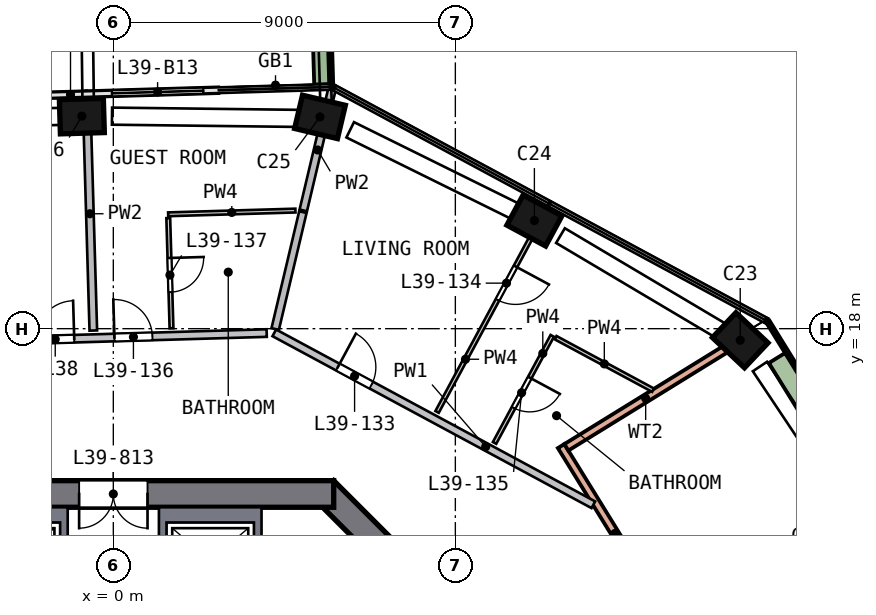
"""IFC4 building model, lengths in metres.
Left out: names, types, materials, properties, quantities, classifications, styles, units other than length and angle.
Written with IfcOpenShell. Run it as: python <this file> out.ifc"""

import sys

from ifc_helpers import new_model, si_unit, direction, frame, frame_2d, origin, origin_2d, place, context, subcontext, project, spatial, polyline, rectangle, outline, extrude, element, fill, save


model = new_model("IFC4")
c1 = context("Model", 3, precision=1e-05, world=origin(), true_north=direction((0.0, 1.0)))
c2 = subcontext(c1, "Body", "Model", "MODEL_VIEW")
j1 = project(units=[si_unit("LENGTHUNIT", "METRE"), si_unit("PLANEANGLEUNIT", "RADIAN")], contexts=[c1])
p1 = place(None, origin())
s1 = spatial("IfcSite", under=j1, at=p1, CompositionType="ELEMENT")
p2 = place(p1, origin())
s2 = spatial("IfcBuilding", under=s1, at=p2, CompositionType="ELEMENT")
p3 = place(p2, frame((0.0, 0.0, 162.0)))
s3 = spatial("IfcBuildingStorey", under=s2, at=p3, CompositionType="ELEMENT", Elevation=162.0)
p4 = place(p3, frame((16.598, 17.601, 0.0), z_axis=(-0.084388982, 0.078230867, 0.993357152), x_axis=(0.722727157, -0.681487218, 0.115067924)))
e1 = element("IfcColumn", 1, at=p4, inside=s3, PredefinedType="COLUMN", context=c2, shape_type="SweptSolid", body=[
    extrude(rectangle(XDim=1.15, YDim=0.9, at=origin_2d()), origin(), (0.0, 0.0, 1.0), 3.211),
])
p5 = place(p3, frame((11.2, 20.783, 0.0), z_axis=(-0.09932145, 0.052474579, 0.993670805), x_axis=(-0.874616696, 0.471622943, -0.112327356)))
e2 = element("IfcColumn", 2, at=p5, inside=s3, PredefinedType="COLUMN", context=c2, shape_type="SweptSolid", body=[
    extrude(rectangle(XDim=1.15, YDim=0.9, at=origin_2d()), origin(), (0.0, 0.0, 1.0), 3.21),
])
p6 = place(p3, frame((5.574, 23.542, 0.0), z_axis=(-0.112214366, 0.025544734, 0.993355627), x_axis=(0.966669959, -0.228704033, 0.115081082)))
e3 = element("IfcColumn", 3, at=p6, inside=s3, PredefinedType="COLUMN", context=c2, shape_type="SweptSolid", body=[
    extrude(rectangle(XDim=1.15, YDim=0.9, at=origin_2d()), origin(), (0.0, 0.0, 1.0), 3.211),
])
p7 = place(p3, frame((-0.692, 23.598, 0.0), z_axis=(-0.112250014, -0.004182758, 0.993671193), x_axis=(-0.993260713, -0.02857431, -0.112323925)))
e4 = element("IfcColumn", 4, at=p7, inside=s3, PredefinedType="COLUMN", context=c2, shape_type="SweptSolid", body=[
    extrude(rectangle(XDim=1.15, YDim=0.9, at=origin_2d()), origin(), (0.0, 0.0, 1.0), 3.21),
])
p8 = place(p3, frame((13.752, 5.552, 0.0), z_axis=(0.0, 0.0, 1.0), x_axis=(-0.707106781, 0.707106781, 0.0)))
e5 = element("IfcWall", 5, at=p8, inside=s3, PredefinedType="SHEAR", context=c2, shape_type="SweptSolid", body=[
    extrude(rectangle(XDim=11.598, YDim=0.7, at=frame_2d((5.799, 0.0))), origin(), (0.0, 0.0, 1.0), 3.5),
])
p9 = place(p8, frame((2.099, 0.0, 0.0)))
e6 = element("IfcOpeningElement", 6, at=p9, cuts=e5, PredefinedType="OPENING", context=c2, shape_type="SweptSolid", body=[
    extrude(rectangle(XDim=1.2, YDim=2.1, at=frame_2d((0.6, 1.05))), frame((0.0, 0.36, 0.0), z_axis=(0.0, -1.0, 0.0), x_axis=(1.0, 0.0, 0.0)), (0.0, 0.0, 1.0), 0.72),
])
p10 = place(p3, frame((5.799, 13.65, 0.0), z_axis=(0.0, 0.0, 1.0), x_axis=(-1.0, 0.0, 0.0)))
e7 = element("IfcWall", 7, at=p10, inside=s3, PredefinedType="SHEAR", context=c2, shape_type="SweptSolid", body=[
    extrude(rectangle(XDim=11.598, YDim=0.7, at=frame_2d((5.799, 0.0))), origin(), (0.0, 0.0, 1.0), 3.5),
])
p11 = place(p10, frame((4.899, 0.0, 0.0)))
e8 = element("IfcOpeningElement", 8, at=p11, cuts=e7, PredefinedType="OPENING", context=c2, shape_type="SweptSolid", body=[
    extrude(rectangle(XDim=1.8, YDim=2.1, at=frame_2d((0.9, 1.05))), frame((0.0, 0.36, 0.0), z_axis=(0.0, -1.0, 0.0), x_axis=(1.0, 0.0, 0.0)), (0.0, 0.0, 1.0), 0.72),
])
p12 = place(p3, frame((2.764, 24.275, 0.0), z_axis=(0.0, 0.0, 1.0), x_axis=(-0.999568665, -0.029368082, 0.0)))
e9 = element("IfcWall", 9, at=p12, inside=s3, PredefinedType="SOLIDWALL", context=c2, shape_type="SweptSolid", body=[
    extrude(rectangle(XDim=3.475, YDim=0.15, at=frame_2d((1.737, 0.0))), origin(), (0.0, 0.0, 1.0), 2.475),
])
p13 = place(p12, frame((0.4, 0.0, 0.0)))
e10 = element("IfcOpeningElement", 10, at=p13, cuts=e9, PredefinedType="OPENING", context=c2, shape_type="SweptSolid", body=[
    extrude(rectangle(XDim=2.4, YDim=2.4, at=frame_2d((1.2, 1.2))), frame((0.0, 0.085, 0.0), z_axis=(0.0, -1.0, 0.0), x_axis=(1.0, 0.0, 0.0)), (0.0, 0.0, 1.0), 0.17),
])
p14 = place(p3, frame((-0.709, 24.173, 0.0), z_axis=(0.0, 0.0, 1.0), x_axis=(-0.999571268, -0.029279342, 0.0)))
e11 = element("IfcWall", 11, at=p14, inside=s3, PredefinedType="SOLIDWALL", context=c2, shape_type="SweptSolid", body=[
    extrude(rectangle(XDim=3.836, YDim=0.15, at=frame_2d((1.918, 0.0))), origin(), (0.0, 0.0, 1.0), 2.475),
])
p15 = place(p14, frame((1.035, 0.0, 0.0)))
e12 = element("IfcOpeningElement", 12, at=p15, cuts=e11, PredefinedType="OPENING", context=c2, shape_type="SweptSolid", body=[
    extrude(rectangle(XDim=2.4, YDim=2.4, at=frame_2d((1.2, 1.2))), frame((0.0, 0.085, 0.0), z_axis=(0.0, -1.0, 0.0), x_axis=(1.0, 0.0, 0.0)), (0.0, 0.0, 1.0), 0.17),
])
p16 = place(p3, frame((5.536, 24.432, 0.0), z_axis=(0.0, 0.0, 1.0), x_axis=(-0.029304862, 0.99957052, 0.0)))
e13 = element("IfcWall", 13, at=p16, inside=s3, PredefinedType="SOLIDWALL", context=c2, shape_type="SweptSolid", body=[
    extrude(rectangle(XDim=3.199, YDim=0.5, at=frame_2d((1.6, 0.0))), origin(), (0.0, 0.0, 1.0), 0.7),
])
p17 = place(p3, frame((11.784, 14.91, 0.0), z_axis=(0.0, 0.0, 1.0), x_axis=(0.525179384, -0.850991548, 0.0)))
e14 = element("IfcWall", 14, at=p17, inside=s3, PredefinedType="SOLIDWALL", context=c2, shape_type="SweptSolid", body=[
    extrude(rectangle(XDim=13.0, YDim=0.2, at=frame_2d((6.5, 0.0))), origin(), (0.0, 0.0, 1.0), 3.19),
])
p18 = place(p17, frame((5.6, 0.0, 0.0)))
e15 = element("IfcOpeningElement", 15, at=p18, cuts=e14, PredefinedType="OPENING", context=c2, shape_type="SweptSolid", body=[
    extrude(rectangle(XDim=1.8, YDim=2.4, at=frame_2d((0.9, 1.2))), frame((0.0, 0.11, 0.0), z_axis=(0.0, -1.0, 0.0), x_axis=(1.0, 0.0, 0.0)), (0.0, 0.0, 1.0), 0.22),
])
p19 = place(p3, frame((16.094, 17.453, 0.0), z_axis=(0.0, 0.0, 1.0), x_axis=(-0.851008082, -0.525152592, 0.0)))
e16 = element("IfcWall", 16, at=p19, inside=s3, PredefinedType="SOLIDWALL", context=c2, shape_type="SweptSolid", body=[
    extrude(rectangle(XDim=4.904, YDim=0.2, at=frame_2d((2.452, 0.0))), origin(), (0.0, 0.0, 1.0), 3.19),
])
p20 = place(p3, frame((23.973, 7.25, 0.0), z_axis=(0.0, 0.0, 1.0), x_axis=(-0.525170615, 0.85099696, 0.0)))
e17 = element("IfcWall", 17, at=p20, inside=s3, PredefinedType="SOLIDWALL", context=c2, shape_type="SweptSolid", body=[
    extrude(rectangle(XDim=12.84, YDim=0.1, at=frame_2d((6.42, 0.0))), origin(), (0.0, 0.0, 1.0), 0.7),
])
p21 = place(p3, frame((19.802, 13.437, 0.0), z_axis=(0.0, 0.0, 1.0), x_axis=(-0.525152092, 0.85100839, 0.0)))
e18 = element("IfcWall", 18, at=p21, inside=s3, PredefinedType="SOLIDWALL", context=c2, shape_type="SweptSolid", body=[
    extrude(rectangle(XDim=4.454, YDim=0.5, at=frame_2d((2.227, 0.0))), origin(), (0.0, 0.0, 1.0), 0.7),
])
p22 = place(p3, origin())
e19 = element("IfcWall", 19, at=p22, inside=s3, PredefinedType="SOLIDWALL", context=c2, shape_type="SweptSolid", body=[
    extrude(outline(polyline([(3.9, 13.3), (3.9, 10.9), (3.7, 10.9), (3.7, 12.9), (1.4, 12.9), (1.4, 10.9), (1.2, 10.9), (1.2, 13.3), (3.9, 13.3)])), origin(), (0.0, 0.0, 1.0), 3.19),
])
p23 = place(p3, origin())
e20 = element("IfcWall", 20, at=p23, inside=s3, PredefinedType="SOLIDWALL", context=c2, shape_type="SweptSolid", body=[
    extrude(outline(polyline([(-3.9, 10.9), (-3.9, 13.3), (-1.2, 13.3), (-1.2, 10.9), (-1.4, 10.9), (-1.4, 12.9), (-3.7, 12.9), (-3.7, 10.9), (-3.9, 10.9)])), origin(), (0.0, 0.0, 1.0), 3.19),
])
p24 = place(p3, frame((-5.277, 17.611, 0.0), z_axis=(0.0, 0.0, 1.0), x_axis=(0.999569971, 0.029323584, 0.0)))
e21 = element("IfcWall", 21, at=p24, inside=s3, PredefinedType="SOLIDWALL", context=c2, shape_type="SweptSolid", body=[
    extrude(rectangle(XDim=9.316, YDim=0.2, at=frame_2d((4.658, 0.0))), origin(), (0.0, 0.0, 1.0), 3.19),
])
p25 = place(p24, frame((5.308, 0.0, 0.0)))
e22 = element("IfcOpeningElement", 22, at=p25, cuts=e21, PredefinedType="OPENING", context=c2, shape_type="SweptSolid", body=[
    extrude(rectangle(XDim=1.0, YDim=2.1, at=frame_2d((0.5, 1.05))), frame((0.0, 0.11, 0.0), z_axis=(0.0, -1.0, 0.0), x_axis=(1.0, 0.0, 0.0)), (0.0, 0.0, 1.0), 0.22),
])
p26 = place(p24, frame((3.25, 0.0, 0.0)))
e23 = element("IfcOpeningElement", 23, at=p26, cuts=e21, PredefinedType="OPENING", context=c2, shape_type="SweptSolid", body=[
    extrude(rectangle(XDim=1.0, YDim=2.1, at=frame_2d((0.5, 1.05))), frame((0.0, 0.11, 0.0), z_axis=(0.0, -1.0, 0.0), x_axis=(1.0, 0.0, 0.0)), (0.0, 0.0, 1.0), 0.22),
])
p27 = place(p3, frame((4.236, 17.89, 0.0), z_axis=(0.0, 0.0, 1.0), x_axis=(0.880311578, -0.474395959, 0.0)))
e24 = element("IfcWall", 24, at=p27, inside=s3, PredefinedType="SOLIDWALL", context=c2, shape_type="SweptSolid", body=[
    extrude(rectangle(XDim=9.537, YDim=0.2, at=frame_2d((4.768, 0.0))), origin(), (0.0, 0.0, 1.0), 3.19),
])
p28 = place(p27, frame((1.9, 0.0, 0.0)))
e25 = element("IfcOpeningElement", 25, at=p28, cuts=e24, PredefinedType="OPENING", context=c2, shape_type="SweptSolid", body=[
    extrude(rectangle(XDim=1.0, YDim=2.1, at=frame_2d((0.5, 1.05))), frame((0.0, 0.11, 0.0), z_axis=(0.0, -1.0, 0.0), x_axis=(1.0, 0.0, 0.0)), (0.0, 0.0, 1.0), 0.22),
])
p29 = place(p3, frame((-0.527, 17.951, 0.0), z_axis=(0.0, 0.0, 1.0), x_axis=(-0.029297558, 0.999570734, 0.0)))
e26 = element("IfcWall", 26, at=p29, inside=s3, PredefinedType="SOLIDWALL", context=c2, shape_type="SweptSolid", body=[
    extrude(rectangle(XDim=6.15, YDim=0.2, at=frame_2d((3.075, 0.0))), origin(), (0.0, 0.0, 1.0), 3.19),
])
p30 = place(p3, frame((4.26, 17.991, 0.0), z_axis=(0.0, 0.0, 1.0), x_axis=(0.230360547, 0.973105348, 0.0)))
e27 = element("IfcWall", 27, at=p30, inside=s3, PredefinedType="SOLIDWALL", context=c2, shape_type="SweptSolid", body=[
    extrude(rectangle(XDim=3.161, YDim=0.2, at=frame_2d((1.581, 0.0))), origin(), (0.0, 0.0, 1.0), 3.19),
])
p31 = place(p3, frame((4.998, 21.112, 0.0), z_axis=(0.0, 0.0, 1.0), x_axis=(0.230425438, 0.973089984, 0.0)))
e28 = element("IfcWall", 28, at=p31, inside=s3, PredefinedType="SOLIDWALL", context=c2, shape_type="SweptSolid", body=[
    extrude(rectangle(XDim=3.269, YDim=0.2, at=frame_2d((1.634, 0.0))), origin(), (0.0, 0.0, 1.0), 3.19),
])
p32 = place(p3, frame((1.446, 20.91, 0.0), z_axis=(0.0, 0.0, 1.0), x_axis=(0.029381734, -0.999568264, 0.0)))
e29 = element("IfcWall", 29, at=p32, inside=s3, PredefinedType="PARTITIONING", context=c2, shape_type="SweptSolid", body=[
    extrude(rectangle(XDim=2.9, YDim=0.1, at=frame_2d((1.45, 0.0))), origin(), (0.0, 0.0, 1.0), 3.19),
])
p33 = place(p32, frame((1.05, 0.0, 0.0)))
e30 = element("IfcOpeningElement", 30, at=p33, cuts=e29, PredefinedType="OPENING", context=c2, shape_type="SweptSolid", body=[
    extrude(rectangle(XDim=0.9, YDim=2.1, at=frame_2d((0.45, 1.05))), frame((0.0, 0.06, 0.0), z_axis=(0.0, -1.0, 0.0), x_axis=(1.0, 0.0, 0.0)), (0.0, 0.0, 1.0), 0.12),
])
p34 = place(p3, frame((1.443, 21.01, 0.0), z_axis=(0.0, 0.0, 1.0), x_axis=(0.999570835, 0.029294122, 0.0)))
e31 = element("IfcWall", 31, at=p34, inside=s3, PredefinedType="PARTITIONING", context=c2, shape_type="SweptSolid", body=[
    extrude(rectangle(XDim=3.35, YDim=0.1, at=frame_2d((1.675, 0.0))), origin(), (0.0, 0.0, 1.0), 3.19),
])
p35 = place(p3, frame((11.437, 21.223, 0.0), z_axis=(0.0, 0.0, 1.0), x_axis=(-0.474409898, -0.880304066, 0.0)))
e32 = element("IfcWall", 32, at=p35, inside=s3, PredefinedType="PARTITIONING", context=c2, shape_type="SweptSolid", body=[
    extrude(rectangle(XDim=6.15, YDim=0.1, at=frame_2d((3.075, 0.0))), origin(), (0.0, 0.0, 1.0), 3.19),
])
p36 = place(p35, frame((1.8, 0.0, 0.0)))
e33 = element("IfcOpeningElement", 33, at=p36, cuts=e32, PredefinedType="OPENING", context=c2, shape_type="SweptSolid", body=[
    extrude(rectangle(XDim=1.0, YDim=2.1, at=frame_2d((0.5, 1.05))), frame((0.0, 0.06, 0.0), z_axis=(0.0, -1.0, 0.0), x_axis=(1.0, 0.0, 0.0)), (0.0, 0.0, 1.0), 0.12),
])
p37 = place(p3, frame((11.55, 17.811, 0.0), z_axis=(0.0, 0.0, 1.0), x_axis=(-0.474409178, -0.880304454, 0.0)))
e34 = element("IfcWall", 34, at=p37, inside=s3, PredefinedType="PARTITIONING", context=c2, shape_type="SweptSolid", body=[
    extrude(rectangle(XDim=3.2, YDim=0.1, at=frame_2d((1.6, 0.0))), origin(), (0.0, 0.0, 1.0), 3.19),
])
p38 = place(p37, frame((1.25, 0.0, 0.0)))
e35 = element("IfcOpeningElement", 35, at=p38, cuts=e34, PredefinedType="OPENING", context=c2, shape_type="SweptSolid", body=[
    extrude(rectangle(XDim=0.9, YDim=2.1, at=frame_2d((0.45, 1.05))), frame((0.0, 0.06, 0.0), z_axis=(0.0, -1.0, 0.0), x_axis=(1.0, 0.0, 0.0)), (0.0, 0.0, 1.0), 0.12),
])
p39 = place(p3, frame((14.201, 16.382, 0.0), z_axis=(0.0, 0.0, 1.0), x_axis=(-0.880306815, 0.474404797, 0.0)))
e36 = element("IfcWall", 36, at=p39, inside=s3, PredefinedType="PARTITIONING", context=c2, shape_type="SweptSolid", body=[
    extrude(rectangle(XDim=2.912, YDim=0.1, at=frame_2d((1.456, 0.0))), origin(), (0.0, 0.0, 1.0), 3.19),
])
p40 = place(p13, origin())
e37 = element("IfcDoor", 37, at=p40, inside=s3, OperationType="SLIDING_TO_RIGHT", PredefinedType="DOOR", context=c2, shape_type="SweptSolid", body=[
    extrude(rectangle(XDim=2.4, YDim=2.4, at=frame_2d((1.2, 1.2))), frame((0.0, 0.025, 0.0), z_axis=(0.0, -1.0, 0.0), x_axis=(1.0, 0.0, 0.0)), (0.0, 0.0, 1.0), 0.05),
])
fill(e10, e37)
p41 = place(p11, origin())
e38 = element("IfcDoor", 38, at=p41, inside=s3, OperationType="DOUBLE_DOOR_SINGLE_SWING", PredefinedType="DOOR", context=c2, shape_type="SweptSolid", body=[
    extrude(rectangle(XDim=1.8, YDim=2.1, at=frame_2d((0.9, 1.05))), frame((0.0, 0.025, 0.0), z_axis=(0.0, -1.0, 0.0), x_axis=(1.0, 0.0, 0.0)), (0.0, 0.0, 1.0), 0.05),
])
fill(e8, e38)
p42 = place(p28, origin())
e39 = element("IfcDoor", 39, at=p42, inside=s3, OperationType="SINGLE_SWING_LEFT", PredefinedType="DOOR", context=c2, shape_type="SweptSolid", body=[
    extrude(rectangle(XDim=1.0, YDim=2.1, at=frame_2d((0.5, 1.05))), frame((0.0, 0.025, 0.0), z_axis=(0.0, -1.0, 0.0), x_axis=(1.0, 0.0, 0.0)), (0.0, 0.0, 1.0), 0.05),
])
fill(e25, e39)
p43 = place(p36, origin())
e40 = element("IfcDoor", 40, at=p43, inside=s3, OperationType="SINGLE_SWING_LEFT", PredefinedType="DOOR", context=c2, shape_type="SweptSolid", body=[
    extrude(rectangle(XDim=1.0, YDim=2.1, at=frame_2d((0.5, 1.05))), frame((0.0, 0.025, 0.0), z_axis=(0.0, -1.0, 0.0), x_axis=(1.0, 0.0, 0.0)), (0.0, 0.0, 1.0), 0.05),
])
fill(e33, e40)
p44 = place(p38, origin())
e41 = element("IfcDoor", 41, at=p44, inside=s3, OperationType="SINGLE_SWING_LEFT", PredefinedType="DOOR", context=c2, shape_type="SweptSolid", body=[
    extrude(rectangle(XDim=0.9, YDim=2.1, at=frame_2d((0.45, 1.05))), frame((0.0, 0.025, 0.0), z_axis=(0.0, -1.0, 0.0), x_axis=(1.0, 0.0, 0.0)), (0.0, 0.0, 1.0), 0.05),
])
fill(e35, e41)
p45 = place(p25, origin())
e42 = element("IfcDoor", 42, at=p45, inside=s3, OperationType="SINGLE_SWING_LEFT", PredefinedType="DOOR", context=c2, shape_type="SweptSolid", body=[
    extrude(rectangle(XDim=1.0, YDim=2.1, at=frame_2d((0.5, 1.05))), frame((0.0, 0.025, 0.0), z_axis=(0.0, -1.0, 0.0), x_axis=(1.0, 0.0, 0.0)), (0.0, 0.0, 1.0), 0.05),
])
fill(e22, e42)
p46 = place(p33, origin())
e43 = element("IfcDoor", 43, at=p46, inside=s3, OperationType="SINGLE_SWING_LEFT", PredefinedType="DOOR", context=c2, shape_type="SweptSolid", body=[
    extrude(rectangle(XDim=0.9, YDim=2.1, at=frame_2d((0.45, 1.05))), frame((0.0, 0.025, 0.0), z_axis=(0.0, -1.0, 0.0), x_axis=(1.0, 0.0, 0.0)), (0.0, 0.0, 1.0), 0.05),
])
fill(e30, e43)
p47 = place(p26, origin())
e44 = element("IfcDoor", 44, at=p47, inside=s3, OperationType="SINGLE_SWING_RIGHT", PredefinedType="DOOR", context=c2, shape_type="SweptSolid", body=[
    extrude(rectangle(XDim=1.0, YDim=2.1, at=frame_2d((0.5, 1.05))), frame((0.0, 0.025, 0.0), z_axis=(0.0, -1.0, 0.0), x_axis=(1.0, 0.0, 0.0)), (0.0, 0.0, 1.0), 0.05),
])
fill(e23, e44)
save(model, sys.argv[1])
